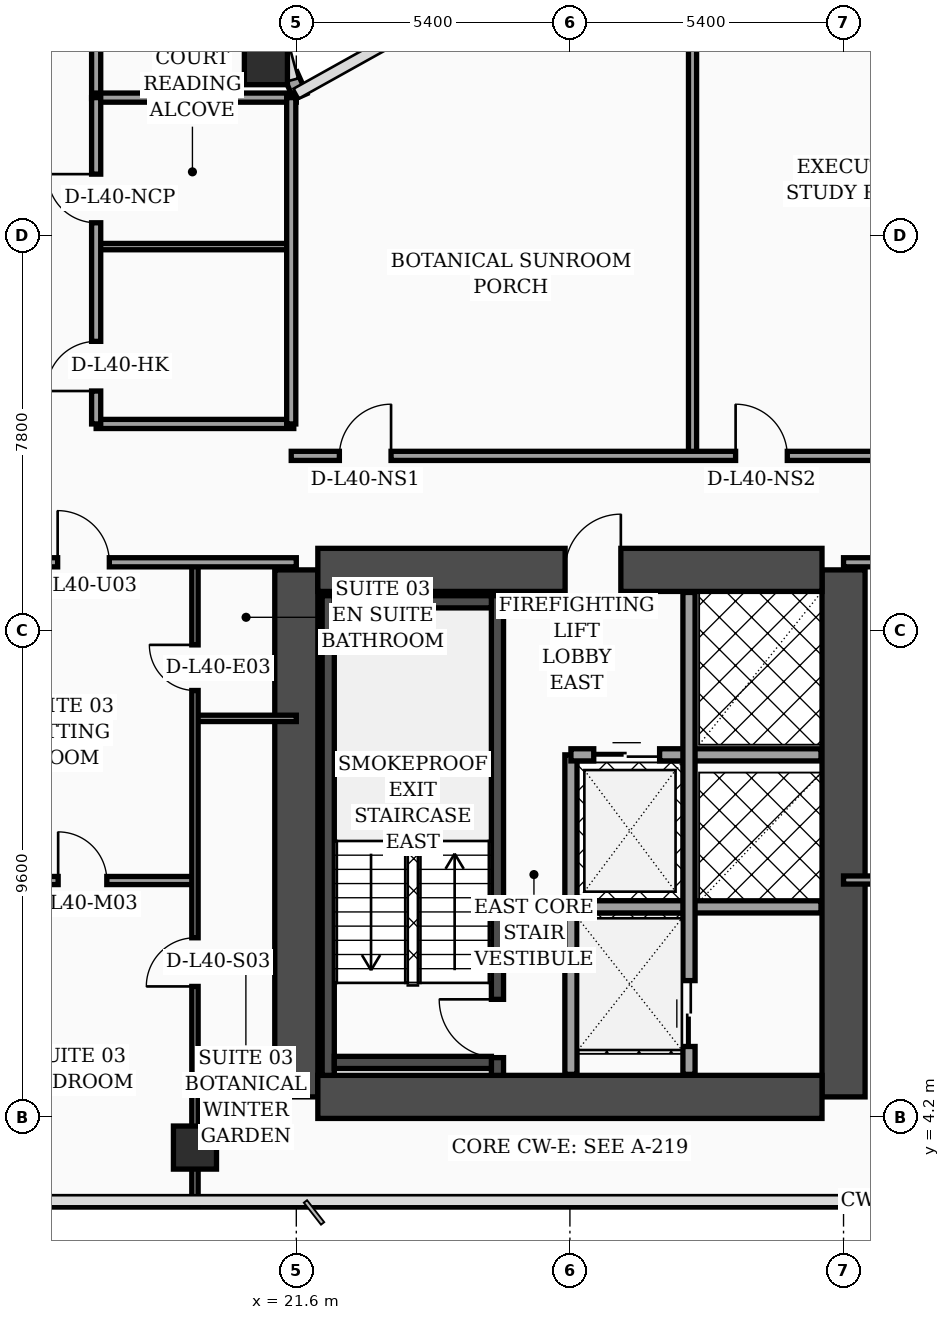
"""IFC4 building model, lengths in metres.
Left out: names, types, materials, properties, quantities, classifications, styles, units other than length and angle.
Written with IfcOpenShell. Run it as: python <this file> out.ifc"""

import sys

from ifc_helpers import new_model, si_unit, direction, frame, frame_2d, origin, origin_2d, place, context, subcontext, project, spatial, rectangle, hollow_rectangle, extrude, element, fill, save


model = new_model("IFC4")
c1 = context("Model", 3, precision=1e-05, world=origin(), true_north=direction((0.0, 1.0)))
c2 = subcontext(c1, "Body", "Model", "MODEL_VIEW")
j1 = project(units=[si_unit("LENGTHUNIT", "METRE"), si_unit("PLANEANGLEUNIT", "RADIAN")], contexts=[c1])
p1 = place(None, origin())
s1 = spatial("IfcSite", under=j1, at=p1, CompositionType="ELEMENT")
p2 = place(p1, origin())
s2 = spatial("IfcBuilding", under=s1, at=p2, CompositionType="ELEMENT")
p3 = place(p2, frame((0.0, 0.0, 163.7)))
s3 = spatial("IfcBuildingStorey", under=s2, at=p3, CompositionType="ELEMENT", Elevation=163.7)
for number, where, z_axis, x_axis in (
    (1, (21.6, 4.6, 0.0), (0.0, 0.0, 1.0), (0.0, 1.0, 0.0)),
    (2, (32.4, 4.6, 0.0), (0.0, 0.0, 1.0), (0.0, 1.0, 0.0)),
):
    element("IfcWall", number, at=place(p3, frame(where, z_axis=z_axis, x_axis=x_axis)), inside=s3, PredefinedType="SHEAR", context=c2, shape_type="SweptSolid", body=[
        extrude(rectangle(XDim=10.4, YDim=0.85, at=frame_2d((5.2, 0.0))), origin(), (0.0, 0.0, 1.0), 3.56),
    ])
p4 = place(p3, frame((22.025, 15.0, 0.0), z_axis=(0.0, 0.0, 1.0), x_axis=(1.0, 0.0, 0.0)))
e3 = element("IfcWall", 3, at=p4, inside=s3, PredefinedType="SHEAR", context=c2, shape_type="SweptSolid", body=[
    extrude(rectangle(XDim=9.95, YDim=0.85, at=frame_2d((4.975, 0.0))), origin(), (0.0, 0.0, 1.0), 3.56),
])
p5 = place(p4, frame((4.88, 0.0, 0.0)))
e4 = element("IfcOpeningElement", 4, at=p5, cuts=e3, PredefinedType="OPENING", context=c2, shape_type="SweptSolid", body=[
    extrude(rectangle(XDim=1.1, YDim=2.2, at=frame_2d((0.55, 1.1))), frame((0.0, 0.435, 0.0), z_axis=(0.0, -1.0, 0.0), x_axis=(1.0, 0.0, 0.0)), (0.0, 0.0, 1.0), 0.87),
])
p6 = place(p3, frame((22.025, 4.6, 0.0), z_axis=(0.0, 0.0, 1.0), x_axis=(1.0, 0.0, 0.0)))
e5 = element("IfcWall", 5, at=p6, inside=s3, PredefinedType="SHEAR", context=c2, shape_type="SweptSolid", body=[
    extrude(rectangle(XDim=9.95, YDim=0.85, at=frame_2d((4.975, 0.0))), origin(), (0.0, 0.0, 1.0), 3.56),
])
p7 = place(p3, frame((22.23, 5.025, 0.0), z_axis=(0.0, 0.0, 1.0), x_axis=(0.0, 1.0, 0.0)))
e6 = element("IfcWall", 6, at=p7, inside=s3, PredefinedType="SOLIDWALL", context=c2, shape_type="SweptSolid", body=[
    extrude(rectangle(XDim=9.465, YDim=0.24, at=frame_2d((4.732, 0.0))), origin(), (0.0, 0.0, 1.0), 3.56),
])
p8 = place(p3, frame((25.57, 5.025, 0.0), z_axis=(0.0, 0.0, 1.0), x_axis=(0.0, 1.0, 0.0)))
e7 = element("IfcWall", 7, at=p8, inside=s3, PredefinedType="SOLIDWALL", context=c2, shape_type="SweptSolid", body=[
    extrude(rectangle(XDim=9.465, YDim=0.24, at=frame_2d((4.732, 0.0))), origin(), (0.0, 0.0, 1.0), 3.56),
])
p9 = place(p8, frame((0.35, 0.0, 0.0)))
e8 = element("IfcOpeningElement", 8, at=p9, cuts=e7, PredefinedType="OPENING", context=c2, shape_type="SweptSolid", body=[
    extrude(rectangle(XDim=1.15, YDim=2.2, at=frame_2d((0.575, 1.1))), frame((0.0, 0.13, 0.0), z_axis=(0.0, -1.0, 0.0), x_axis=(1.0, 0.0, 0.0)), (0.0, 0.0, 1.0), 0.26),
])
for number, where, z_axis, x_axis in (
    (9, (22.35, 5.28, 0.0), (0.0, 0.0, 1.0), (1.0, 0.0, 0.0)),
    (10, (22.35, 14.37, 0.0), (0.0, 0.0, 1.0), (1.0, 0.0, 0.0)),
):
    element("IfcWall", number, at=place(p3, frame(where, z_axis=z_axis, x_axis=x_axis)), inside=s3, PredefinedType="SOLIDWALL", context=c2, shape_type="SweptSolid", body=[
        extrude(rectangle(XDim=3.1, YDim=0.24, at=frame_2d((1.55, 0.0))), origin(), (0.0, 0.0, 1.0), 3.56),
    ])
for number, where, z_axis, x_axis in (
    (11, (21.0, 25.0, 0.0), (0.0, 0.0, 1.0), (1.0, 0.0, 0.0)),
    (12, (19.6, 3.6, 0.0), (0.0, 0.0, 1.0), (1.0, 0.0, 0.0)),
):
    element("IfcColumn", number, at=place(p3, frame(where, z_axis=z_axis, x_axis=x_axis)), inside=s3, PredefinedType="COLUMN", context=c2, shape_type="SweptSolid", body=[
        extrude(hollow_rectangle(XDim=0.85, YDim=0.85, WallThickness=0.036, at=origin_2d()), origin(), (0.0, 0.0, 1.0), 3.56),
    ])
p10 = place(p3, frame((21.68, 24.34, 0.0), z_axis=(0.0, 0.0, 1.0), x_axis=(-0.40758134973, 0.913168901875, 0.0)))
e13 = element("IfcWall", 13, at=p10, inside=s3, PredefinedType="SOLIDWALL", context=c2, shape_type="SweptSolid", body=[
    extrude(rectangle(XDim=0.471, YDim=0.28, at=frame_2d((0.235, 0.0))), origin(), (0.0, 0.0, 1.0), 3.56),
])
p11 = place(p3, frame((27.02, 5.045, 0.0), z_axis=(0.0, 0.0, 1.0), x_axis=(0.0, 1.0, 0.0)))
e14 = element("IfcWall", 14, at=p11, inside=s3, PredefinedType="SOLIDWALL", context=c2, shape_type="SweptSolid", body=[
    extrude(rectangle(XDim=6.305, YDim=0.24, at=frame_2d((3.153, 0.0))), origin(), (0.0, 0.0, 1.0), 3.56),
])
p12 = place(p3, frame((27.02, 11.35, 0.0), z_axis=(0.0, 0.0, 1.0), x_axis=(1.0, 0.0, 0.0)))
e15 = element("IfcWall", 15, at=p12, inside=s3, PredefinedType="SOLIDWALL", context=c2, shape_type="SweptSolid", body=[
    extrude(rectangle(XDim=4.935, YDim=0.24, at=frame_2d((2.468, 0.0))), origin(), (0.0, 0.0, 1.0), 3.56),
])
p13 = place(p12, frame((0.45, 0.0, 0.0)))
e16 = element("IfcOpeningElement", 16, at=p13, cuts=e15, PredefinedType="OPENING", context=c2, shape_type="SweptSolid", body=[
    extrude(rectangle(XDim=1.3, YDim=2.35, at=frame_2d((0.65, 1.175))), frame((0.0, 0.13, 0.0), z_axis=(0.0, -1.0, 0.0), x_axis=(1.0, 0.0, 0.0)), (0.0, 0.0, 1.0), 0.26),
])
p14 = place(p3, frame((27.02, 8.35, 0.0), z_axis=(0.0, 0.0, 1.0), x_axis=(1.0, 0.0, 0.0)))
e17 = element("IfcWall", 17, at=p14, inside=s3, PredefinedType="SOLIDWALL", context=c2, shape_type="SweptSolid", body=[
    extrude(rectangle(XDim=4.935, YDim=0.24, at=frame_2d((2.468, 0.0))), origin(), (0.0, 0.0, 1.0), 3.09),
])
p15 = place(p3, frame((29.35, 5.045, 0.0), z_axis=(0.0, 0.0, 1.0), x_axis=(0.0, 1.0, 0.0)))
e18 = element("IfcWall", 18, at=p15, inside=s3, PredefinedType="SOLIDWALL", context=c2, shape_type="SweptSolid", body=[
    extrude(rectangle(XDim=9.51, YDim=0.24, at=frame_2d((4.755, 0.0))), origin(), (0.0, 0.0, 1.0), 3.56),
])
p16 = place(p15, frame((0.55, 0.0, 0.0)))
e19 = element("IfcOpeningElement", 19, at=p16, cuts=e18, PredefinedType="OPENING", context=c2, shape_type="SweptSolid", body=[
    extrude(rectangle(XDim=1.3, YDim=2.35, at=frame_2d((0.65, 1.175))), frame((0.0, 0.13, 0.0), z_axis=(0.0, -1.0, 0.0), x_axis=(1.0, 0.0, 0.0)), (0.0, 0.0, 1.0), 0.26),
])
p17 = place(p3, frame((19.6, 12.07, 0.0), z_axis=(0.0, 0.0, 1.0), x_axis=(1.0, 0.0, 0.0)))
e20 = element("IfcWall", 20, at=p17, inside=s3, PredefinedType="PARTITIONING", context=c2, shape_type="SweptSolid", body=[
    extrude(rectangle(XDim=2.0, YDim=0.125, at=frame_2d((1.0, 0.0))), origin(), (0.0, 0.0, 1.0), 3.56),
])
p18 = place(p3, frame((15.15, 8.87, 0.0), z_axis=(0.0, 0.0, 1.0), x_axis=(1.0, 0.0, 0.0)))
e21 = element("IfcWall", 21, at=p18, inside=s3, PredefinedType="PARTITIONING", context=c2, shape_type="SweptSolid", body=[
    extrude(rectangle(XDim=4.45, YDim=0.16, at=frame_2d((2.225, 0.0))), origin(), (0.0, 0.0, 1.0), 3.56),
])
p19 = place(p18, frame((1.75, 0.0, 0.0)))
e22 = element("IfcOpeningElement", 22, at=p19, cuts=e21, PredefinedType="OPENING", context=c2, shape_type="SweptSolid", body=[
    extrude(rectangle(XDim=0.96, YDim=2.2, at=frame_2d((0.48, 1.1))), frame((0.0, 0.09, 0.0), z_axis=(0.0, -1.0, 0.0), x_axis=(1.0, 0.0, 0.0)), (0.0, 0.0, 1.0), 0.18),
])
p20 = place(p3, frame((19.6, 2.44, 0.0), z_axis=(0.0, 0.0, 1.0), x_axis=(0.0, 1.0, 0.0)))
e23 = element("IfcWall", 23, at=p20, inside=s3, PredefinedType="PARTITIONING", context=c2, shape_type="SweptSolid", body=[
    extrude(rectangle(XDim=12.71, YDim=0.125, at=frame_2d((6.355, 0.0))), origin(), (0.0, 0.0, 1.0), 2.49),
])
p21 = place(p20, frame((4.34, 0.0, 0.0)))
e24 = element("IfcOpeningElement", 24, at=p21, cuts=e23, PredefinedType="OPENING", context=c2, shape_type="SweptSolid", body=[
    extrude(rectangle(XDim=0.96, YDim=2.2, at=frame_2d((0.48, 1.1))), frame((0.0, 0.073, 0.0), z_axis=(0.0, -1.0, 0.0), x_axis=(1.0, 0.0, 0.0)), (0.0, 0.0, 1.0), 0.145),
])
p22 = place(p20, frame((10.18, 0.0, 0.0)))
e25 = element("IfcOpeningElement", 25, at=p22, cuts=e23, PredefinedType="OPENING", context=c2, shape_type="SweptSolid", body=[
    extrude(rectangle(XDim=0.9, YDim=2.15, at=frame_2d((0.45, 1.075))), frame((0.0, 0.073, 0.0), z_axis=(0.0, -1.0, 0.0), x_axis=(1.0, 0.0, 0.0)), (0.0, 0.0, 1.0), 0.145),
])
p23 = place(p3, frame((15.15, 15.15, 0.0), z_axis=(0.0, 0.0, 1.0), x_axis=(1.0, 0.0, 0.0)))
e26 = element("IfcWall", 26, at=p23, inside=s3, PredefinedType="PARTITIONING", context=c2, shape_type="SweptSolid", body=[
    extrude(rectangle(XDim=6.45, YDim=0.18, at=frame_2d((3.225, 0.0))), origin(), (0.0, 0.0, 1.0), 2.49),
])
p24 = place(p23, frame((1.74, 0.0, 0.0)))
e27 = element("IfcOpeningElement", 27, at=p24, cuts=e26, PredefinedType="OPENING", context=c2, shape_type="SweptSolid", body=[
    extrude(rectangle(XDim=1.02, YDim=2.2, at=frame_2d((0.51, 1.1))), frame((0.0, 0.1, 0.0), z_axis=(0.0, -1.0, 0.0), x_axis=(1.0, 0.0, 0.0)), (0.0, 0.0, 1.0), 0.2),
])
p25 = place(p3, frame((17.65, 24.3, 0.0), z_axis=(0.0, 0.0, 1.0), x_axis=(0.0, 1.0, 0.0)))
e28 = element("IfcWall", 28, at=p25, inside=s3, PredefinedType="PARTITIONING", context=c2, shape_type="SweptSolid", body=[
    extrude(rectangle(XDim=17.65, YDim=0.18, at=frame_2d((8.825, 0.0))), origin(), (0.0, 0.0, 1.0), 2.94),
])
p26 = place(p3, frame((17.65, 17.88, 0.0), z_axis=(0.0, 0.0, 1.0), x_axis=(1.0, 0.0, 0.0)))
e29 = element("IfcWall", 29, at=p26, inside=s3, PredefinedType="PARTITIONING", context=c2, shape_type="SweptSolid", body=[
    extrude(rectangle(XDim=3.9, YDim=0.18, at=frame_2d((1.95, 0.0))), origin(), (0.0, 0.0, 1.0), 3.56),
])
p27 = place(p3, frame((17.65, 21.38, 0.0), z_axis=(0.0, 0.0, 1.0), x_axis=(1.0, 0.0, 0.0)))
e30 = element("IfcWall", 30, at=p27, inside=s3, PredefinedType="PARTITIONING", context=c2, shape_type="SweptSolid", body=[
    extrude(rectangle(XDim=3.9, YDim=0.125, at=frame_2d((1.95, 0.0))), origin(), (0.0, 0.0, 1.0), 3.56),
])
p28 = place(p3, frame((17.65, 24.32, 0.0), z_axis=(0.0, 0.0, 1.0), x_axis=(1.0, 0.0, 0.0)))
e31 = element("IfcWall", 31, at=p28, inside=s3, PredefinedType="PARTITIONING", context=c2, shape_type="SweptSolid", body=[
    extrude(rectangle(XDim=3.95, YDim=0.18, at=frame_2d((1.975, 0.0))), origin(), (0.0, 0.0, 1.0), 3.56),
])
p29 = place(p3, frame((21.5, 17.88, 0.0), z_axis=(0.0, 0.0, 1.0), x_axis=(0.0, 1.0, 0.0)))
e32 = element("IfcWall", 32, at=p29, inside=s3, PredefinedType="PARTITIONING", context=c2, shape_type="SweptSolid", body=[
    extrude(rectangle(XDim=6.44, YDim=0.18, at=frame_2d((3.22, 0.0))), origin(), (0.0, 0.0, 1.0), 3.56),
])
p30 = place(p3, frame((17.65, 17.88, 0.0), z_axis=(0.0, 0.0, 1.0), x_axis=(0.0, 1.0, 0.0)))
e33 = element("IfcWall", 33, at=p30, inside=s3, PredefinedType="PARTITIONING", context=c2, shape_type="SweptSolid", body=[
    extrude(rectangle(XDim=6.44, YDim=0.18, at=frame_2d((3.22, 0.0))), origin(), (0.0, 0.0, 1.0), 3.56),
])
p31 = place(p30, frame((0.65, 0.0, 0.0)))
e34 = element("IfcOpeningElement", 34, at=p31, cuts=e33, PredefinedType="OPENING", context=c2, shape_type="SweptSolid", body=[
    extrude(rectangle(XDim=0.98, YDim=2.15, at=frame_2d((0.49, 1.075))), frame((0.0, 0.1, 0.0), z_axis=(0.0, -1.0, 0.0), x_axis=(1.0, 0.0, 0.0)), (0.0, 0.0, 1.0), 0.2),
])
p32 = place(p30, frame((3.97, 0.0, 0.0)))
e35 = element("IfcOpeningElement", 35, at=p32, cuts=e33, PredefinedType="OPENING", context=c2, shape_type="SweptSolid", body=[
    extrude(rectangle(XDim=0.96, YDim=2.2, at=frame_2d((0.48, 1.1))), frame((0.0, 0.1, 0.0), z_axis=(0.0, -1.0, 0.0), x_axis=(1.0, 0.0, 0.0)), (0.0, 0.0, 1.0), 0.2),
])
p33 = place(p3, frame((32.4, 8.88, 0.0), z_axis=(0.0, 0.0, 1.0), x_axis=(1.0, 0.0, 0.0)))
e36 = element("IfcWall", 36, at=p33, inside=s3, PredefinedType="PARTITIONING", context=c2, shape_type="SweptSolid", body=[
    extrude(rectangle(XDim=4.82, YDim=0.16, at=frame_2d((2.41, 0.0))), origin(), (0.0, 0.0, 1.0), 2.94),
])
p34 = place(p33, frame((1.93, 0.0, 0.0)))
e37 = element("IfcOpeningElement", 37, at=p34, cuts=e36, PredefinedType="OPENING", context=c2, shape_type="SweptSolid", body=[
    extrude(rectangle(XDim=0.96, YDim=2.2, at=frame_2d((0.48, 1.1))), frame((0.0, 0.09, 0.0), z_axis=(0.0, -1.0, 0.0), x_axis=(1.0, 0.0, 0.0)), (0.0, 0.0, 1.0), 0.18),
])
p35 = place(p3, frame((32.4, 15.15, 0.0), z_axis=(0.0, 0.0, 1.0), x_axis=(1.0, 0.0, 0.0)))
e38 = element("IfcWall", 38, at=p35, inside=s3, PredefinedType="PARTITIONING", context=c2, shape_type="SweptSolid", body=[
    extrude(rectangle(XDim=13.05, YDim=0.18, at=frame_2d((6.525, 0.0))), origin(), (0.0, 0.0, 1.0), 2.94),
])
p36 = place(p35, frame((2.0, 0.0, 0.0)))
e39 = element("IfcOpeningElement", 39, at=p36, cuts=e38, PredefinedType="OPENING", context=c2, shape_type="SweptSolid", body=[
    extrude(rectangle(XDim=1.02, YDim=2.2, at=frame_2d((0.51, 1.1))), frame((0.0, 0.1, 0.0), z_axis=(0.0, -1.0, 0.0), x_axis=(1.0, 0.0, 0.0)), (0.0, 0.0, 1.0), 0.2),
])
p37 = place(p35, frame((8.43, 0.0, 0.0)))
e40 = element("IfcOpeningElement", 40, at=p37, cuts=e38, PredefinedType="OPENING", context=c2, shape_type="SweptSolid", body=[
    extrude(rectangle(XDim=1.02, YDim=2.2, at=frame_2d((0.51, 1.1))), frame((0.0, 0.1, 0.0), z_axis=(0.0, -1.0, 0.0), x_axis=(1.0, 0.0, 0.0)), (0.0, 0.0, 1.0), 0.2),
])
p38 = place(p3, frame((29.42, 17.25, 0.0), z_axis=(0.0, 0.0, 1.0), x_axis=(0.0, 1.0, 0.0)))
e41 = element("IfcWall", 41, at=p38, inside=s3, PredefinedType="PARTITIONING", context=c2, shape_type="SweptSolid", body=[
    extrude(rectangle(XDim=11.59, YDim=0.16, at=frame_2d((5.795, 0.0))), origin(), (0.0, 0.0, 1.0), 2.94),
])
p39 = place(p3, frame((21.5, 17.25, 0.0), z_axis=(0.0, 0.0, 1.0), x_axis=(1.0, 0.0, 0.0)))
e42 = element("IfcWall", 42, at=p39, inside=s3, PredefinedType="PARTITIONING", context=c2, shape_type="SweptSolid", body=[
    extrude(rectangle(XDim=21.6, YDim=0.18, at=frame_2d((10.8, 0.0))), origin(), (0.0, 0.0, 1.0), 2.94),
])
p40 = place(p39, frame((0.95, 0.0, 0.0)))
e43 = element("IfcOpeningElement", 43, at=p40, cuts=e42, PredefinedType="OPENING", context=c2, shape_type="SweptSolid", body=[
    extrude(rectangle(XDim=1.02, YDim=2.2, at=frame_2d((0.51, 1.1))), frame((0.0, 0.1, 0.0), z_axis=(0.0, -1.0, 0.0), x_axis=(1.0, 0.0, 0.0)), (0.0, 0.0, 1.0), 0.2),
])
p41 = place(p39, frame((8.77, 0.0, 0.0)))
e44 = element("IfcOpeningElement", 44, at=p41, cuts=e42, PredefinedType="OPENING", context=c2, shape_type="SweptSolid", body=[
    extrude(rectangle(XDim=1.02, YDim=2.2, at=frame_2d((0.51, 1.1))), frame((0.0, 0.1, 0.0), z_axis=(0.0, -1.0, 0.0), x_axis=(1.0, 0.0, 0.0)), (0.0, 0.0, 1.0), 0.2),
])
p42 = place(p39, frame((15.28, 0.0, 0.0)))
e45 = element("IfcOpeningElement", 45, at=p42, cuts=e42, PredefinedType="OPENING", context=c2, shape_type="SweptSolid", body=[
    extrude(rectangle(XDim=1.02, YDim=2.2, at=frame_2d((0.51, 1.1))), frame((0.0, 0.1, 0.0), z_axis=(0.0, -1.0, 0.0), x_axis=(1.0, 0.0, 0.0)), (0.0, 0.0, 1.0), 0.2),
])
p43 = place(p13, origin())
e46 = element("IfcDoor", 46, at=p43, inside=s3, OperationType="DOUBLE_DOOR_SLIDING", PredefinedType="DOOR", context=c2, shape_type="SweptSolid", body=[
    extrude(rectangle(XDim=1.3, YDim=2.35, at=frame_2d((0.65, 1.175))), frame((0.0, 0.025, 0.0), z_axis=(0.0, -1.0, 0.0), x_axis=(1.0, 0.0, 0.0)), (0.0, 0.0, 1.0), 0.05),
])
fill(e16, e46)
p44 = place(p16, origin())
e47 = element("IfcDoor", 47, at=p44, inside=s3, OperationType="DOUBLE_DOOR_SLIDING", PredefinedType="DOOR", context=c2, shape_type="SweptSolid", body=[
    extrude(rectangle(XDim=1.3, YDim=2.35, at=frame_2d((0.65, 1.175))), frame((0.0, 0.025, 0.0), z_axis=(0.0, -1.0, 0.0), x_axis=(1.0, 0.0, 0.0)), (0.0, 0.0, 1.0), 0.05),
])
fill(e19, e47)
p45 = place(p19, origin())
e48 = element("IfcDoor", 48, at=p45, inside=s3, OperationType="SINGLE_SWING_LEFT", PredefinedType="DOOR", context=c2, shape_type="SweptSolid", body=[
    extrude(rectangle(XDim=0.96, YDim=2.2, at=frame_2d((0.48, 1.1))), frame((0.0, 0.025, 0.0), z_axis=(0.0, -1.0, 0.0), x_axis=(1.0, 0.0, 0.0)), (0.0, 0.0, 1.0), 0.05),
])
fill(e22, e48)
p46 = place(p21, origin())
e49 = element("IfcDoor", 49, at=p46, inside=s3, OperationType="SINGLE_SWING_LEFT", PredefinedType="DOOR", context=c2, shape_type="SweptSolid", body=[
    extrude(rectangle(XDim=0.96, YDim=2.2, at=frame_2d((0.48, 1.1))), frame((0.0, 0.025, 0.0), z_axis=(0.0, -1.0, 0.0), x_axis=(1.0, 0.0, 0.0)), (0.0, 0.0, 1.0), 0.05),
])
fill(e24, e49)
p47 = place(p22, origin())
e50 = element("IfcDoor", 50, at=p47, inside=s3, OperationType="SINGLE_SWING_RIGHT", PredefinedType="DOOR", context=c2, shape_type="SweptSolid", body=[
    extrude(rectangle(XDim=0.9, YDim=2.15, at=frame_2d((0.45, 1.075))), frame((0.0, 0.025, 0.0), z_axis=(0.0, -1.0, 0.0), x_axis=(1.0, 0.0, 0.0)), (0.0, 0.0, 1.0), 0.05),
])
fill(e25, e50)
p48 = place(p24, origin())
e51 = element("IfcDoor", 51, at=p48, inside=s3, OperationType="SINGLE_SWING_LEFT", PredefinedType="DOOR", context=c2, shape_type="SweptSolid", body=[
    extrude(rectangle(XDim=1.02, YDim=2.2, at=frame_2d((0.51, 1.1))), frame((0.0, 0.025, 0.0), z_axis=(0.0, -1.0, 0.0), x_axis=(1.0, 0.0, 0.0)), (0.0, 0.0, 1.0), 0.05),
])
fill(e27, e51)
p49 = place(p31, origin())
e52 = element("IfcDoor", 52, at=p49, inside=s3, OperationType="SINGLE_SWING_LEFT", PredefinedType="DOOR", context=c2, shape_type="SweptSolid", body=[
    extrude(rectangle(XDim=0.98, YDim=2.15, at=frame_2d((0.49, 1.075))), frame((0.0, 0.025, 0.0), z_axis=(0.0, -1.0, 0.0), x_axis=(1.0, 0.0, 0.0)), (0.0, 0.0, 1.0), 0.05),
])
fill(e34, e52)
p50 = place(p32, origin())
e53 = element("IfcDoor", 53, at=p50, inside=s3, OperationType="SINGLE_SWING_RIGHT", PredefinedType="DOOR", context=c2, shape_type="SweptSolid", body=[
    extrude(rectangle(XDim=0.96, YDim=2.2, at=frame_2d((0.48, 1.1))), frame((0.0, 0.025, 0.0), z_axis=(0.0, -1.0, 0.0), x_axis=(1.0, 0.0, 0.0)), (0.0, 0.0, 1.0), 0.05),
])
fill(e35, e53)
p51 = place(p40, origin())
e54 = element("IfcDoor", 54, at=p51, inside=s3, OperationType="SINGLE_SWING_RIGHT", PredefinedType="DOOR", context=c2, shape_type="SweptSolid", body=[
    extrude(rectangle(XDim=1.02, YDim=2.2, at=frame_2d((0.51, 1.1))), frame((0.0, 0.025, 0.0), z_axis=(0.0, -1.0, 0.0), x_axis=(1.0, 0.0, 0.0)), (0.0, 0.0, 1.0), 0.05),
])
fill(e43, e54)
p52 = place(p41, origin())
e55 = element("IfcDoor", 55, at=p52, inside=s3, OperationType="SINGLE_SWING_LEFT", PredefinedType="DOOR", context=c2, shape_type="SweptSolid", body=[
    extrude(rectangle(XDim=1.02, YDim=2.2, at=frame_2d((0.51, 1.1))), frame((0.0, 0.025, 0.0), z_axis=(0.0, -1.0, 0.0), x_axis=(1.0, 0.0, 0.0)), (0.0, 0.0, 1.0), 0.05),
])
fill(e44, e55)
p53 = place(p9, origin())
e56 = element("IfcDoor", 56, at=p53, inside=s3, OperationType="SINGLE_SWING_RIGHT", PredefinedType="DOOR", context=c2, shape_type="SweptSolid", body=[
    extrude(rectangle(XDim=1.15, YDim=2.2, at=frame_2d((0.575, 1.1))), frame((0.0, 0.025, 0.0), z_axis=(0.0, -1.0, 0.0), x_axis=(1.0, 0.0, 0.0)), (0.0, 0.0, 1.0), 0.05),
])
fill(e8, e56)
p54 = place(p5, origin())
e57 = element("IfcDoor", 57, at=p54, inside=s3, OperationType="SINGLE_SWING_RIGHT", PredefinedType="DOOR", context=c2, shape_type="SweptSolid", body=[
    extrude(rectangle(XDim=1.1, YDim=2.2, at=frame_2d((0.55, 1.1))), frame((0.0, 0.025, 0.0), z_axis=(0.0, -1.0, 0.0), x_axis=(1.0, 0.0, 0.0)), (0.0, 0.0, 1.0), 0.05),
])
fill(e4, e57)
save(model, sys.argv[1])
